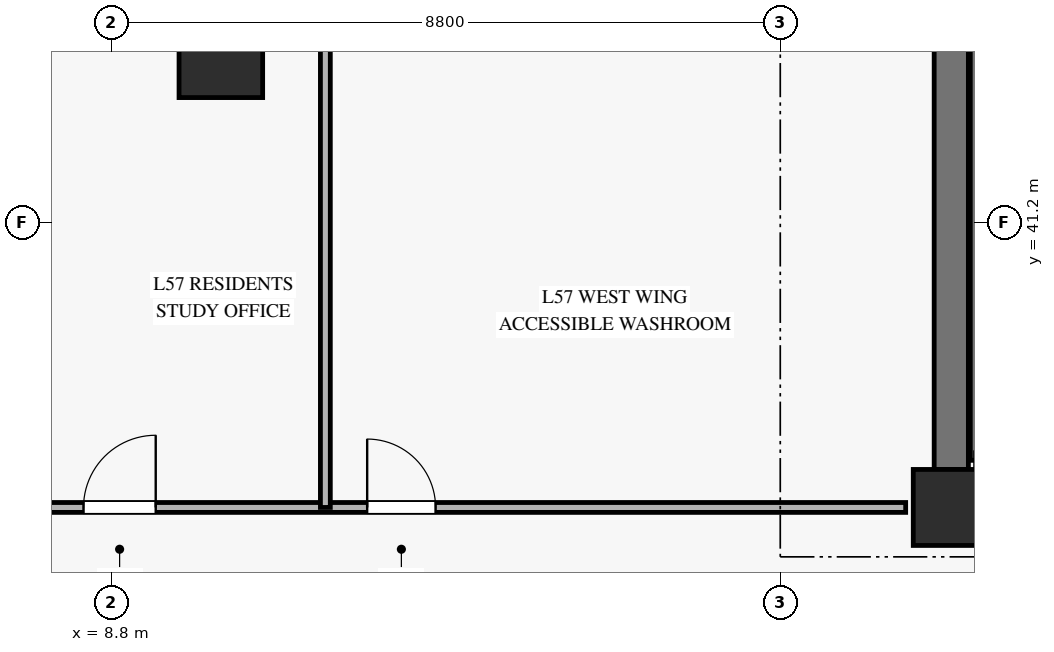
"""IFC4 building model, lengths in metres.
Left out: names, types, materials, properties, quantities, classifications, styles, units other than length and angle.
Written with IfcOpenShell. Run it as: python <this file> out.ifc"""

import sys

from ifc_helpers import new_model, si_unit, direction, frame, frame_2d, origin, origin_2d, place, context, subcontext, project, spatial, rectangle, hollow_rectangle, extrude, source, transform, mapped, element, fill, save


model = new_model("IFC4")
c1 = context("Model", 3, precision=1e-05, world=origin(), true_north=direction((0.0, 1.0)))
c2 = subcontext(c1, "Body", "Model", "MODEL_VIEW")
j1 = project(units=[si_unit("LENGTHUNIT", "METRE"), si_unit("PLANEANGLEUNIT", "RADIAN")], contexts=[c1])
p1 = place(None, origin())
s1 = spatial("IfcSite", under=j1, at=p1, CompositionType="ELEMENT")
p2 = place(p1, origin())
s2 = spatial("IfcBuilding", under=s1, at=p2, CompositionType="ELEMENT")
p3 = place(p2, frame((0.0, 0.0, 227.0)))
s3 = spatial("IfcBuildingStorey", under=s2, at=p3, CompositionType="ELEMENT", Elevation=227.0)
m1 = source(origin(), c2, "Body", "SweptSolid", [
    extrude(rectangle(XDim=1.0, YDim=1.0, at=origin_2d()), origin(), (0.0, 0.0, 1.0), 3.185),
])
p4 = place(p3, frame((19.85, 37.45, 0.0), z_axis=(0.0, 0.0, 1.0), x_axis=(1.0, 0.0, 0.0)))
e1 = element("IfcColumn", 1, at=p4, inside=s3, PredefinedType="PILASTER", context=c2, shape_type="MappedRepresentation", body=[
    mapped(m1, transform((0.0, 0.0, 0.0), x_axis=(1.0, 0.0, 0.0), y_axis=(0.0, 1.0, 0.0), z_axis=(0.0, 0.0, 1.0), scale=1.0)),
])
p5 = place(p3, frame((19.85, 37.95, 0.0), z_axis=(0.0, 0.0, 1.0), x_axis=(0.0, 1.0, 0.0)))
e2 = element("IfcWall", 2, at=p5, inside=s3, PredefinedType="SHEAR", context=c2, shape_type="SweptSolid", body=[
    extrude(rectangle(XDim=8.1, YDim=0.45, at=frame_2d((4.05, 0.0))), origin(), (0.0, 0.0, 1.0), 3.185),
])
m2 = source(origin(), c2, "Body", "SweptSolid", [
    extrude(hollow_rectangle(XDim=1.1, YDim=1.1, WallThickness=0.05, at=origin_2d()), origin(), (0.0, 0.0, 1.0), 3.185),
])
p6 = place(p3, frame((10.24, 43.393, 0.0), z_axis=(0.0, 0.0, 1.0), x_axis=(1.0, 0.0, 0.0)))
e3 = element("IfcColumn", 3, at=p6, inside=s3, PredefinedType="COLUMN", context=c2, shape_type="MappedRepresentation", body=[
    mapped(m2, transform((0.0, 0.0, 0.0), x_axis=(1.0, 0.0, 0.0), y_axis=(0.0, 1.0, 0.0), z_axis=(0.0, 0.0, 1.0), scale=1.0)),
])
p7 = place(p3, frame((9.94, 46.25, 0.0), z_axis=(0.0, 0.0, 1.0), x_axis=(-0.644314839722, -0.764760346326, 0.0)))
e4 = element("IfcWall", 4, at=p7, inside=s3, PredefinedType="SOLIDWALL", context=c2, shape_type="SweptSolid", body=[
    extrude(rectangle(XDim=3.736, YDim=0.3, at=frame_2d((1.868, 0.0))), origin(), (0.0, 0.0, 1.0), 2.815),
])
p8 = place(p7, frame((1.068, 0.0, 0.45)))
e5 = element("IfcOpeningElement", 5, at=p8, cuts=e4, PredefinedType="OPENING", context=c2, shape_type="SweptSolid", body=[
    extrude(rectangle(XDim=1.6, YDim=2.0, at=frame_2d((0.8, 1.0))), frame((0.0, 0.16, 0.0), z_axis=(0.0, -1.0, 0.0), x_axis=(1.0, 0.0, 0.0)), (0.0, 0.0, 1.0), 0.32),
])
p9 = place(p3, frame((20.17, 38.07, 0.0), z_axis=(0.0, 0.0, 1.0), x_axis=(0.0, 1.0, 0.0)))
e6 = element("IfcWall", 6, at=p9, inside=s3, PredefinedType="SOLIDWALL", context=c2, shape_type="SweptSolid", body=[
    extrude(rectangle(XDim=7.25, YDim=0.14, at=frame_2d((3.625, 0.0))), origin(), (0.0, 0.0, 1.0), 3.4),
])
p10 = place(p3, frame((7.533, 37.45, 0.0), z_axis=(0.0, 0.0, 1.0), x_axis=(1.0, 0.0, 0.0)))
e7 = element("IfcWall", 7, at=p10, inside=s3, PredefinedType="PARTITIONING", context=c2, shape_type="SweptSolid", body=[
    extrude(rectangle(XDim=11.717, YDim=0.13, at=frame_2d((5.858, 0.0))), origin(), (0.0, 0.0, 1.0), 2.82),
])
p11 = place(p10, frame((0.9, 0.0, 0.0)))
e8 = element("IfcOpeningElement", 8, at=p11, cuts=e7, PredefinedType="OPENING", context=c2, shape_type="SweptSolid", body=[
    extrude(rectangle(XDim=0.95, YDim=2.1, at=frame_2d((0.475, 1.05))), frame((0.0, 0.075, 0.0), z_axis=(0.0, -1.0, 0.0), x_axis=(1.0, 0.0, 0.0)), (0.0, 0.0, 1.0), 0.15),
])
p12 = place(p10, frame((4.632, 0.0, 0.0)))
e9 = element("IfcOpeningElement", 9, at=p12, cuts=e7, PredefinedType="OPENING", context=c2, shape_type="SweptSolid", body=[
    extrude(rectangle(XDim=0.9, YDim=2.1, at=frame_2d((0.45, 1.05))), frame((0.0, 0.075, 0.0), z_axis=(0.0, -1.0, 0.0), x_axis=(1.0, 0.0, 0.0)), (0.0, 0.0, 1.0), 0.15),
])
p13 = place(p3, frame((11.615, 37.45, 0.0), z_axis=(0.0, 0.0, 1.0), x_axis=(0.0, 1.0, 0.0)))
e10 = element("IfcWall", 10, at=p13, inside=s3, PredefinedType="PARTITIONING", context=c2, shape_type="SweptSolid", body=[
    extrude(rectangle(XDim=8.8, YDim=0.13, at=frame_2d((4.4, 0.0))), origin(), (0.0, 0.0, 1.0), 3.185),
])
m3 = source(origin(), c2, "Body", "SweptSolid", [
    extrude(rectangle(XDim=0.95, YDim=2.1, at=frame_2d((0.475, 1.05))), frame((0.0, 0.025, 0.0), z_axis=(0.0, -1.0, 0.0), x_axis=(1.0, 0.0, 0.0)), (0.0, 0.0, 1.0), 0.05),
])
p14 = place(p11, origin())
e11 = element("IfcDoor", 11, at=p14, inside=s3, OperationType="SINGLE_SWING_RIGHT", PredefinedType="DOOR", context=c2, shape_type="MappedRepresentation", body=[
    mapped(m3, transform((0.0, 0.0, 0.0), x_axis=(1.0, 0.0, 0.0), y_axis=(0.0, 1.0, 0.0), z_axis=(0.0, 0.0, 1.0), scale=1.0)),
])
fill(e8, e11)
m4 = source(origin(), c2, "Body", "SweptSolid", [
    extrude(rectangle(XDim=0.9, YDim=2.1, at=frame_2d((0.45, 1.05))), frame((0.0, 0.025, 0.0), z_axis=(0.0, -1.0, 0.0), x_axis=(1.0, 0.0, 0.0)), (0.0, 0.0, 1.0), 0.05),
])
p15 = place(p12, origin())
e12 = element("IfcDoor", 12, at=p15, inside=s3, OperationType="SINGLE_SWING_LEFT", PredefinedType="DOOR", context=c2, shape_type="MappedRepresentation", body=[
    mapped(m4, transform((0.0, 0.0, 0.0), x_axis=(1.0, 0.0, 0.0), y_axis=(0.0, 1.0, 0.0), z_axis=(0.0, 0.0, 1.0), scale=1.0)),
])
fill(e9, e12)
save(model, sys.argv[1])
